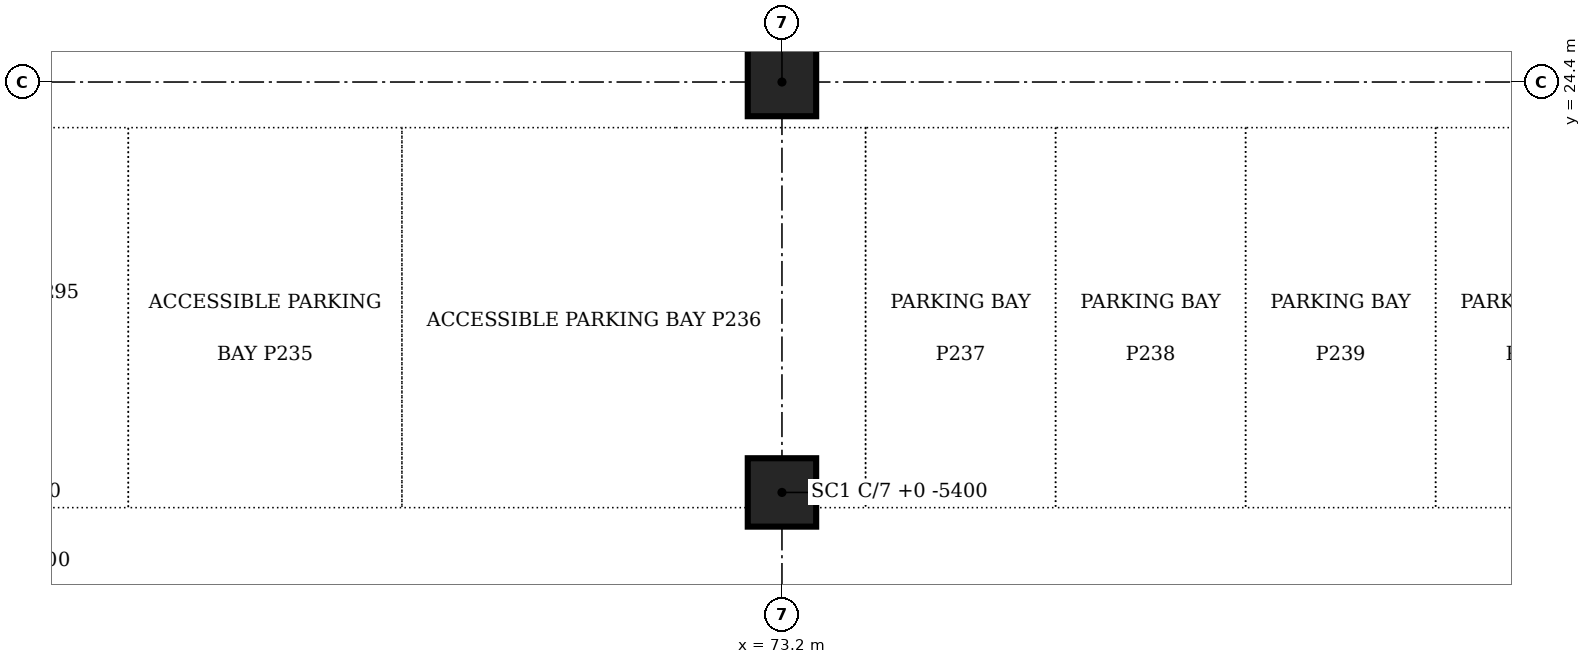
"""IFC4 building model, lengths in metres.
Left out: names, types, materials, properties, quantities, classifications, styles, units other than length and angle.
Written with IfcOpenShell. Run it as: python <this file> out.ifc"""

import sys

from ifc_helpers import new_model, si_unit, direction, frame, origin, origin_2d, place, context, subcontext, project, spatial, polyline, rectangle, outline, extrude, element, save


model = new_model("IFC4")
c1 = context("Model", 3, precision=1e-05, world=origin(), true_north=direction((0.0, 1.0)))
c2 = subcontext(c1, "Body", "Model", "MODEL_VIEW")
j1 = project(units=[si_unit("LENGTHUNIT", "METRE"), si_unit("PLANEANGLEUNIT", "RADIAN")], contexts=[c1])
p1 = place(None, origin())
s1 = spatial("IfcSite", under=j1, at=p1, CompositionType="ELEMENT")
p2 = place(p1, origin())
s2 = spatial("IfcBuilding", under=s1, at=p2, CompositionType="ELEMENT")
p3 = place(p2, frame((0.0, 0.0, -5.4)))
s3 = spatial("IfcBuildingStorey", under=s2, at=p3, CompositionType="ELEMENT", Elevation=-5.4)
p4 = place(p3, frame((0.0, 0.0, -0.2)))
e1 = element("IfcWall", 1, at=p4, inside=s3, PredefinedType="SOLIDWALL", context=c2, shape_type="SweptSolid", body=[
    extrude(outline(polyline([(60.5, 18.8), (61.0, 18.3), (138.7, 18.3), (138.2, 18.8), (60.5, 18.8)])), origin(), (0.0, 0.0, 1.0), 5.6),
])
for number, where, z_axis, x_axis in (
    (2, (73.2, 24.4, 0.0), (0.0, 0.0, 1.0), (1.0, 0.0, 0.0)),
    (3, (73.2, 19.0, 0.0), (0.0, 0.0, 1.0), (1.0, 0.0, 0.0)),
):
    element("IfcColumn", number, at=place(p3, frame(where, z_axis=z_axis, x_axis=x_axis)), inside=s3, PredefinedType="COLUMN", context=c2, shape_type="SweptSolid", body=[
        extrude(rectangle(XDim=0.9, YDim=0.9, at=origin_2d()), origin(), (0.0, 0.0, 1.0), 5.15),
    ])
save(model, sys.argv[1])
